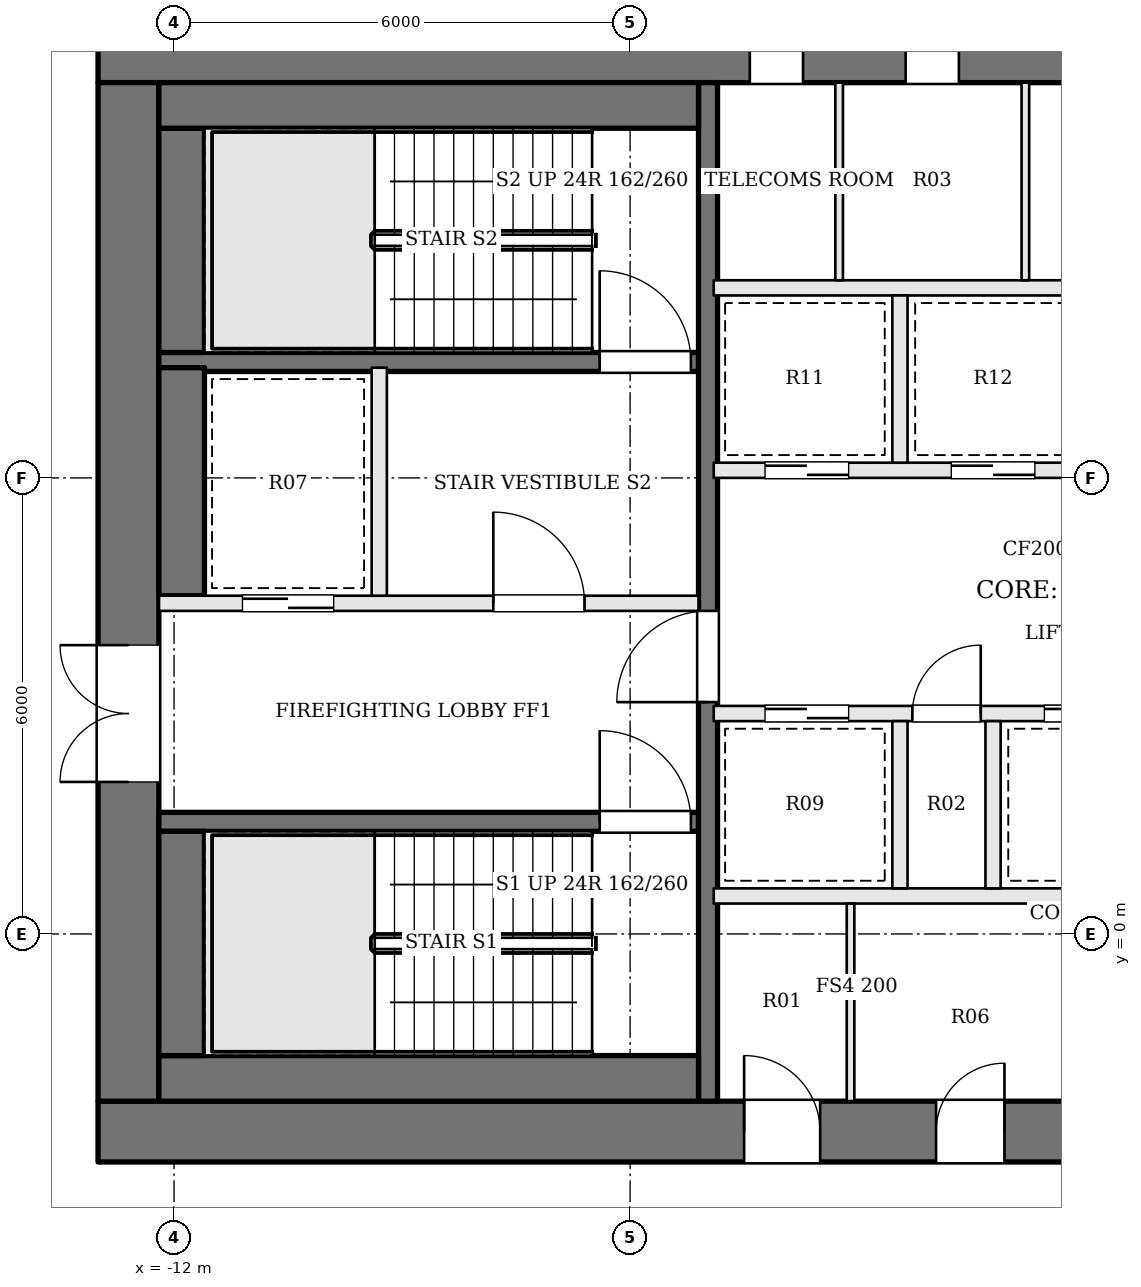
"""IFC4 building model, lengths in metres.
Left out: names, types, materials, properties, quantities, classifications, styles, units other than length and angle.
Written with IfcOpenShell. Run it as: python <this file> out.ifc"""

import sys

from ifc_helpers import new_model, si_unit, direction, frame, frame_2d, origin, place, context, subcontext, project, spatial, rectangle, extrude, element, fill, save


model = new_model("IFC4")
c1 = context("Model", 3, precision=1e-05, world=origin(), true_north=direction((0.0, 1.0)))
c2 = subcontext(c1, "Body", "Model", "MODEL_VIEW")
j1 = project(units=[si_unit("LENGTHUNIT", "METRE"), si_unit("PLANEANGLEUNIT", "RADIAN")], contexts=[c1])
p1 = place(None, origin())
s1 = spatial("IfcSite", under=j1, at=p1, CompositionType="ELEMENT")
p2 = place(p1, origin())
s2 = spatial("IfcBuilding", under=s1, at=p2, CompositionType="ELEMENT")
p3 = place(p2, frame((0.0, 0.0, 237.0)))
s3 = spatial("IfcBuildingStorey", under=s2, at=p3, CompositionType="ELEMENT", Elevation=237.0)
p4 = place(p3, frame((-13.0, 11.6, 0.0), z_axis=(0.0, 0.0, 1.0), x_axis=(1.0, 0.0, 0.0)))
e1 = element("IfcWall", 1, at=p4, inside=s3, PredefinedType="SHEAR", context=c2, shape_type="SweptSolid", body=[
    extrude(rectangle(XDim=26.0, YDim=0.8, at=frame_2d((13.0, 0.0))), origin(), (0.0, 0.0, 1.0), 3.9),
])
p5 = place(p4, frame((8.575, 0.0, 0.0)))
e2 = element("IfcOpeningElement", 2, at=p5, cuts=e1, PredefinedType="OPENING", context=c2, shape_type="SweptSolid", body=[
    extrude(rectangle(XDim=0.7, YDim=2.1, at=frame_2d((0.35, 1.05))), frame((0.0, 0.41, 0.0), z_axis=(0.0, -1.0, 0.0), x_axis=(1.0, 0.0, 0.0)), (0.0, 0.0, 1.0), 0.82),
])
p6 = place(p4, frame((10.625, 0.0, 0.0)))
e3 = element("IfcOpeningElement", 3, at=p6, cuts=e1, PredefinedType="OPENING", context=c2, shape_type="SweptSolid", body=[
    extrude(rectangle(XDim=0.7, YDim=2.1, at=frame_2d((0.35, 1.05))), frame((0.0, 0.41, 0.0), z_axis=(0.0, -1.0, 0.0), x_axis=(1.0, 0.0, 0.0)), (0.0, 0.0, 1.0), 0.82),
])
p7 = place(p4, frame((13.325, 0.0, 0.0)))
e4 = element("IfcOpeningElement", 4, at=p7, cuts=e1, PredefinedType="OPENING", context=c2, shape_type="SweptSolid", body=[
    extrude(rectangle(XDim=1.0, YDim=2.1, at=frame_2d((0.5, 1.05))), frame((0.0, 0.41, 0.0), z_axis=(0.0, -1.0, 0.0), x_axis=(1.0, 0.0, 0.0)), (0.0, 0.0, 1.0), 0.82),
])
p8 = place(p4, frame((15.65, 0.0, 0.0)))
e5 = element("IfcOpeningElement", 5, at=p8, cuts=e1, PredefinedType="OPENING", context=c2, shape_type="SweptSolid", body=[
    extrude(rectangle(XDim=1.0, YDim=2.1, at=frame_2d((0.5, 1.05))), frame((0.0, 0.41, 0.0), z_axis=(0.0, -1.0, 0.0), x_axis=(1.0, 0.0, 0.0)), (0.0, 0.0, 1.0), 0.82),
])
p9 = place(p3, frame((-13.0, -2.6, 0.0), z_axis=(0.0, 0.0, 1.0), x_axis=(1.0, 0.0, 0.0)))
e6 = element("IfcWall", 6, at=p9, inside=s3, PredefinedType="SHEAR", context=c2, shape_type="SweptSolid", body=[
    extrude(rectangle(XDim=26.0, YDim=0.8, at=frame_2d((13.0, 0.0))), origin(), (0.0, 0.0, 1.0), 3.9),
])
p10 = place(p9, frame((8.5, 0.0, 0.0)))
e7 = element("IfcOpeningElement", 7, at=p10, cuts=e6, PredefinedType="OPENING", context=c2, shape_type="SweptSolid", body=[
    extrude(rectangle(XDim=1.0, YDim=2.1, at=frame_2d((0.5, 1.05))), frame((0.0, 0.41, 0.0), z_axis=(0.0, -1.0, 0.0), x_axis=(1.0, 0.0, 0.0)), (0.0, 0.0, 1.0), 0.82),
])
p11 = place(p9, frame((11.025, 0.0, 0.0)))
e8 = element("IfcOpeningElement", 8, at=p11, cuts=e6, PredefinedType="OPENING", context=c2, shape_type="SweptSolid", body=[
    extrude(rectangle(XDim=0.9, YDim=2.1, at=frame_2d((0.45, 1.05))), frame((0.0, 0.41, 0.0), z_axis=(0.0, -1.0, 0.0), x_axis=(1.0, 0.0, 0.0)), (0.0, 0.0, 1.0), 0.82),
])
p12 = place(p9, frame((14.225, 0.0, 0.0)))
e9 = element("IfcOpeningElement", 9, at=p12, cuts=e6, PredefinedType="OPENING", context=c2, shape_type="SweptSolid", body=[
    extrude(rectangle(XDim=0.9, YDim=2.1, at=frame_2d((0.45, 1.05))), frame((0.0, 0.41, 0.0), z_axis=(0.0, -1.0, 0.0), x_axis=(1.0, 0.0, 0.0)), (0.0, 0.0, 1.0), 0.82),
])
p13 = place(p9, frame((16.6, 0.0, 0.0)))
e10 = element("IfcOpeningElement", 10, at=p13, cuts=e6, PredefinedType="OPENING", context=c2, shape_type="SweptSolid", body=[
    extrude(rectangle(XDim=1.0, YDim=2.1, at=frame_2d((0.5, 1.05))), frame((0.0, 0.41, 0.0), z_axis=(0.0, -1.0, 0.0), x_axis=(1.0, 0.0, 0.0)), (0.0, 0.0, 1.0), 0.82),
])
p14 = place(p3, frame((-12.6, -2.2, 0.0), z_axis=(0.0, 0.0, 1.0), x_axis=(0.0, 1.0, 0.0)))
e11 = element("IfcWall", 11, at=p14, inside=s3, PredefinedType="SHEAR", context=c2, shape_type="SweptSolid", body=[
    extrude(rectangle(XDim=13.4, YDim=0.8, at=frame_2d((6.7, 0.0))), origin(), (0.0, 0.0, 1.0), 3.9),
])
p15 = place(p14, frame((4.2, 0.0, 0.0)))
e12 = element("IfcOpeningElement", 12, at=p15, cuts=e11, PredefinedType="OPENING", context=c2, shape_type="SweptSolid", body=[
    extrude(rectangle(XDim=1.8, YDim=2.1, at=frame_2d((0.9, 1.05))), frame((0.0, 0.41, 0.0), z_axis=(0.0, -1.0, 0.0), x_axis=(1.0, 0.0, 0.0)), (0.0, 0.0, 1.0), 0.82),
])
p16 = place(p3, frame((-12.2, 1.475, 0.0), z_axis=(0.0, 0.0, 1.0), x_axis=(1.0, 0.0, 0.0)))
e13 = element("IfcWall", 13, at=p16, inside=s3, PredefinedType="SOLIDWALL", context=c2, shape_type="SweptSolid", body=[
    extrude(rectangle(XDim=7.1, YDim=0.25, at=frame_2d((3.55, 0.0))), origin(), (0.0, 0.0, 1.0), 3.7),
])
p17 = place(p16, frame((5.8, 0.0, 0.0)))
e14 = element("IfcOpeningElement", 14, at=p17, cuts=e13, PredefinedType="OPENING", context=c2, shape_type="SweptSolid", body=[
    extrude(rectangle(XDim=1.2, YDim=2.1, at=frame_2d((0.6, 1.05))), frame((0.0, 0.135, 0.0), z_axis=(0.0, -1.0, 0.0), x_axis=(1.0, 0.0, 0.0)), (0.0, 0.0, 1.0), 0.27),
])
p18 = place(p3, frame((-12.2, 4.35, 0.0), z_axis=(0.0, 0.0, 1.0), x_axis=(1.0, 0.0, 0.0)))
e15 = element("IfcWall", 15, at=p18, inside=s3, PredefinedType="SOLIDWALL", context=c2, shape_type="SweptSolid", body=[
    extrude(rectangle(XDim=7.1, YDim=0.2, at=frame_2d((3.55, 0.0))), origin(), (0.0, 0.0, 1.0), 3.7),
])
p19 = place(p18, frame((4.4, 0.0, 0.0)))
e16 = element("IfcOpeningElement", 16, at=p19, cuts=e15, PredefinedType="OPENING", context=c2, shape_type="SweptSolid", body=[
    extrude(rectangle(XDim=1.2, YDim=2.1, at=frame_2d((0.6, 1.05))), frame((0.0, 0.11, 0.0), z_axis=(0.0, -1.0, 0.0), x_axis=(1.0, 0.0, 0.0)), (0.0, 0.0, 1.0), 0.22),
])
p20 = place(p18, frame((1.1, 0.0, 0.0)))
e17 = element("IfcOpeningElement", 17, at=p20, cuts=e15, PredefinedType="OPENING", context=c2, shape_type="SweptSolid", body=[
    extrude(rectangle(XDim=1.2, YDim=2.1, at=frame_2d((0.6, 1.05))), frame((0.0, 0.11, 0.0), z_axis=(0.0, -1.0, 0.0), x_axis=(1.0, 0.0, 0.0)), (0.0, 0.0, 1.0), 0.22),
])
p21 = place(p3, frame((-12.2, 7.525, 0.0), z_axis=(0.0, 0.0, 1.0), x_axis=(1.0, 0.0, 0.0)))
e18 = element("IfcWall", 18, at=p21, inside=s3, PredefinedType="SOLIDWALL", context=c2, shape_type="SweptSolid", body=[
    extrude(rectangle(XDim=7.1, YDim=0.25, at=frame_2d((3.55, 0.0))), origin(), (0.0, 0.0, 1.0), 3.7),
])
p22 = place(p21, frame((5.8, 0.0, 0.0)))
e19 = element("IfcOpeningElement", 19, at=p22, cuts=e18, PredefinedType="OPENING", context=c2, shape_type="SweptSolid", body=[
    extrude(rectangle(XDim=1.2, YDim=2.1, at=frame_2d((0.6, 1.05))), frame((0.0, 0.135, 0.0), z_axis=(0.0, -1.0, 0.0), x_axis=(1.0, 0.0, 0.0)), (0.0, 0.0, 1.0), 0.27),
])
p23 = place(p3, frame((-9.3, 4.45, 0.0), z_axis=(0.0, 0.0, 1.0), x_axis=(0.0, 1.0, 0.0)))
e20 = element("IfcWall", 20, at=p23, inside=s3, PredefinedType="SOLIDWALL", context=c2, shape_type="SweptSolid", body=[
    extrude(rectangle(XDim=3.0, YDim=0.2, at=frame_2d((1.5, 0.0))), origin(), (0.0, 0.0, 1.0), 3.7),
])
p24 = place(p3, frame((-4.975, -2.2, 0.0), z_axis=(0.0, 0.0, 1.0), x_axis=(0.0, 1.0, 0.0)))
e21 = element("IfcWall", 21, at=p24, inside=s3, PredefinedType="SOLIDWALL", context=c2, shape_type="SweptSolid", body=[
    extrude(rectangle(XDim=13.4, YDim=0.25, at=frame_2d((6.7, 0.0))), origin(), (0.0, 0.0, 1.0), 3.7),
])
p25 = place(p24, frame((5.25, 0.0, 0.0)))
e22 = element("IfcOpeningElement", 22, at=p25, cuts=e21, PredefinedType="OPENING", context=c2, shape_type="SweptSolid", body=[
    extrude(rectangle(XDim=1.2, YDim=2.1, at=frame_2d((0.6, 1.05))), frame((0.0, 0.135, 0.0), z_axis=(0.0, -1.0, 0.0), x_axis=(1.0, 0.0, 0.0)), (0.0, 0.0, 1.0), 0.27),
])
p26 = place(p3, frame((-12.2, -1.9, 0.0), z_axis=(0.0, 0.0, 1.0), x_axis=(1.0, 0.0, 0.0)))
e23 = element("IfcWall", 23, at=p26, inside=s3, PredefinedType="SOLIDWALL", context=c2, shape_type="SweptSolid", body=[
    extrude(rectangle(XDim=7.1, YDim=0.6, at=frame_2d((3.55, 0.0))), origin(), (0.0, 0.0, 1.0), 3.7),
])
p27 = place(p3, frame((-11.9, -1.6, 0.0), z_axis=(0.0, 0.0, 1.0), x_axis=(0.0, 1.0, 0.0)))
e24 = element("IfcWall", 24, at=p27, inside=s3, PredefinedType="SOLIDWALL", context=c2, shape_type="SweptSolid", body=[
    extrude(rectangle(XDim=2.95, YDim=0.6, at=frame_2d((1.475, 0.0))), origin(), (0.0, 0.0, 1.0), 3.7),
])
p28 = place(p3, frame((-11.9, 4.45, 0.0), z_axis=(0.0, 0.0, 1.0), x_axis=(0.0, 1.0, 0.0)))
e25 = element("IfcWall", 25, at=p28, inside=s3, PredefinedType="SOLIDWALL", context=c2, shape_type="SweptSolid", body=[
    extrude(rectangle(XDim=3.0, YDim=0.6, at=frame_2d((1.5, 0.0))), origin(), (0.0, 0.0, 1.0), 3.7),
])
p29 = place(p3, frame((-11.9, 7.65, 0.0), z_axis=(0.0, 0.0, 1.0), x_axis=(0.0, 1.0, 0.0)))
e26 = element("IfcWall", 26, at=p29, inside=s3, PredefinedType="SOLIDWALL", context=c2, shape_type="SweptSolid", body=[
    extrude(rectangle(XDim=2.95, YDim=0.6, at=frame_2d((1.475, 0.0))), origin(), (0.0, 0.0, 1.0), 3.7),
])
p30 = place(p3, frame((-12.2, 10.9, 0.0), z_axis=(0.0, 0.0, 1.0), x_axis=(1.0, 0.0, 0.0)))
e27 = element("IfcWall", 27, at=p30, inside=s3, PredefinedType="SOLIDWALL", context=c2, shape_type="SweptSolid", body=[
    extrude(rectangle(XDim=7.1, YDim=0.6, at=frame_2d((3.55, 0.0))), origin(), (0.0, 0.0, 1.0), 3.7),
])
p31 = place(p3, frame((-4.9, 0.5, 0.0), z_axis=(0.0, 0.0, 1.0), x_axis=(1.0, 0.0, 0.0)))
e28 = element("IfcWall", 28, at=p31, inside=s3, PredefinedType="SOLIDWALL", context=c2, shape_type="SweptSolid", body=[
    extrude(rectangle(XDim=9.8, YDim=0.2, at=frame_2d((4.9, 0.0))), origin(), (0.0, 0.0, 1.0), 3.7),
])
p32 = place(p3, frame((-4.9, 2.9, 0.0), z_axis=(0.0, 0.0, 1.0), x_axis=(1.0, 0.0, 0.0)))
e29 = element("IfcWall", 29, at=p32, inside=s3, PredefinedType="SOLIDWALL", context=c2, shape_type="SweptSolid", body=[
    extrude(rectangle(XDim=9.8, YDim=0.2, at=frame_2d((4.9, 0.0))), origin(), (0.0, 0.0, 1.0), 3.7),
])
p33 = place(p32, frame((0.675, 0.0, 0.0)))
e30 = element("IfcOpeningElement", 30, at=p33, cuts=e29, PredefinedType="OPENING", context=c2, shape_type="SweptSolid", body=[
    extrude(rectangle(XDim=1.1, YDim=2.1, at=frame_2d((0.55, 1.05))), frame((0.0, 0.11, 0.0), z_axis=(0.0, -1.0, 0.0), x_axis=(1.0, 0.0, 0.0)), (0.0, 0.0, 1.0), 0.22),
])
p34 = place(p32, frame((2.613, 0.0, 0.0)))
e31 = element("IfcOpeningElement", 31, at=p34, cuts=e29, PredefinedType="OPENING", context=c2, shape_type="SweptSolid", body=[
    extrude(rectangle(XDim=0.9, YDim=2.1, at=frame_2d((0.45, 1.05))), frame((0.0, 0.11, 0.0), z_axis=(0.0, -1.0, 0.0), x_axis=(1.0, 0.0, 0.0)), (0.0, 0.0, 1.0), 0.22),
])
p35 = place(p32, frame((4.35, 0.0, 0.0)))
e32 = element("IfcOpeningElement", 32, at=p35, cuts=e29, PredefinedType="OPENING", context=c2, shape_type="SweptSolid", body=[
    extrude(rectangle(XDim=1.1, YDim=2.1, at=frame_2d((0.55, 1.05))), frame((0.0, 0.11, 0.0), z_axis=(0.0, -1.0, 0.0), x_axis=(1.0, 0.0, 0.0)), (0.0, 0.0, 1.0), 0.22),
])
p36 = place(p32, frame((7.463, 0.0, 0.0)))
e33 = element("IfcOpeningElement", 33, at=p36, cuts=e29, PredefinedType="OPENING", context=c2, shape_type="SweptSolid", body=[
    extrude(rectangle(XDim=1.0, YDim=2.1, at=frame_2d((0.5, 1.05))), frame((0.0, 0.11, 0.0), z_axis=(0.0, -1.0, 0.0), x_axis=(1.0, 0.0, 0.0)), (0.0, 0.0, 1.0), 0.22),
])
p37 = place(p3, frame((-4.9, 6.1, 0.0), z_axis=(0.0, 0.0, 1.0), x_axis=(1.0, 0.0, 0.0)))
e34 = element("IfcWall", 34, at=p37, inside=s3, PredefinedType="SOLIDWALL", context=c2, shape_type="SweptSolid", body=[
    extrude(rectangle(XDim=9.8, YDim=0.2, at=frame_2d((4.9, 0.0))), origin(), (0.0, 0.0, 1.0), 3.7),
])
p38 = place(p37, frame((0.675, 0.0, 0.0)))
e35 = element("IfcOpeningElement", 35, at=p38, cuts=e34, PredefinedType="OPENING", context=c2, shape_type="SweptSolid", body=[
    extrude(rectangle(XDim=1.1, YDim=2.1, at=frame_2d((0.55, 1.05))), frame((0.0, 0.11, 0.0), z_axis=(0.0, -1.0, 0.0), x_axis=(1.0, 0.0, 0.0)), (0.0, 0.0, 1.0), 0.22),
])
p39 = place(p37, frame((3.125, 0.0, 0.0)))
e36 = element("IfcOpeningElement", 36, at=p39, cuts=e34, PredefinedType="OPENING", context=c2, shape_type="SweptSolid", body=[
    extrude(rectangle(XDim=1.1, YDim=2.1, at=frame_2d((0.55, 1.05))), frame((0.0, 0.11, 0.0), z_axis=(0.0, -1.0, 0.0), x_axis=(1.0, 0.0, 0.0)), (0.0, 0.0, 1.0), 0.22),
])
p40 = place(p37, frame((5.575, 0.0, 0.0)))
e37 = element("IfcOpeningElement", 37, at=p40, cuts=e34, PredefinedType="OPENING", context=c2, shape_type="SweptSolid", body=[
    extrude(rectangle(XDim=1.1, YDim=2.1, at=frame_2d((0.55, 1.05))), frame((0.0, 0.11, 0.0), z_axis=(0.0, -1.0, 0.0), x_axis=(1.0, 0.0, 0.0)), (0.0, 0.0, 1.0), 0.22),
])
p41 = place(p37, frame((8.025, 0.0, 0.0)))
e38 = element("IfcOpeningElement", 38, at=p41, cuts=e34, PredefinedType="OPENING", context=c2, shape_type="SweptSolid", body=[
    extrude(rectangle(XDim=1.1, YDim=2.1, at=frame_2d((0.55, 1.05))), frame((0.0, 0.11, 0.0), z_axis=(0.0, -1.0, 0.0), x_axis=(1.0, 0.0, 0.0)), (0.0, 0.0, 1.0), 0.22),
])
p42 = place(p3, frame((-4.9, 8.5, 0.0), z_axis=(0.0, 0.0, 1.0), x_axis=(1.0, 0.0, 0.0)))
e39 = element("IfcWall", 39, at=p42, inside=s3, PredefinedType="SOLIDWALL", context=c2, shape_type="SweptSolid", body=[
    extrude(rectangle(XDim=9.8, YDim=0.2, at=frame_2d((4.9, 0.0))), origin(), (0.0, 0.0, 1.0), 3.7),
])
for number, where, z_axis, x_axis in (
    (40, (-2.45, 0.6, 0.0), (0.0, 0.0, 1.0), (0.0, 1.0, 0.0)),
    (41, (-1.225, 0.6, 0.0), (0.0, 0.0, 1.0), (0.0, 1.0, 0.0)),
    (42, (-2.45, 6.2, 0.0), (0.0, 0.0, 1.0), (0.0, 1.0, 0.0)),
):
    element("IfcWall", number, at=place(p3, frame(where, z_axis=z_axis, x_axis=x_axis)), inside=s3, PredefinedType="SOLIDWALL", context=c2, shape_type="SweptSolid", body=[
        extrude(rectangle(XDim=2.2, YDim=0.2, at=frame_2d((1.1, 0.0))), origin(), (0.0, 0.0, 1.0), 3.7),
    ])
for number, where, z_axis, x_axis in (
    (43, (-3.1, -2.2, 0.0), (0.0, 0.0, 1.0), (0.0, 1.0, 0.0)),
    (44, (-3.25, 8.6, 0.0), (0.0, 0.0, 1.0), (0.0, 1.0, 0.0)),
    (45, (-0.8, 8.6, 0.0), (0.0, 0.0, 1.0), (0.0, 1.0, 0.0)),
):
    element("IfcWall", number, at=place(p3, frame(where, z_axis=z_axis, x_axis=x_axis)), inside=s3, PredefinedType="PARTITIONING", context=c2, shape_type="SweptSolid", body=[
        extrude(rectangle(XDim=2.6, YDim=0.1, at=frame_2d((1.3, 0.0))), origin(), (0.0, 0.0, 1.0), 3.7),
    ])
p43 = place(p15, origin())
e46 = element("IfcDoor", 46, at=p43, inside=s3, OperationType="DOUBLE_DOOR_SINGLE_SWING", PredefinedType="DOOR", context=c2, shape_type="SweptSolid", body=[
    extrude(rectangle(XDim=1.8, YDim=2.1, at=frame_2d((0.9, 1.05))), frame((0.0, 0.025, 0.0), z_axis=(0.0, -1.0, 0.0), x_axis=(1.0, 0.0, 0.0)), (0.0, 0.0, 1.0), 0.05),
])
fill(e12, e46)
p44 = place(p25, origin())
e47 = element("IfcDoor", 47, at=p44, inside=s3, OperationType="SINGLE_SWING_LEFT", PredefinedType="DOOR", context=c2, shape_type="SweptSolid", body=[
    extrude(rectangle(XDim=1.2, YDim=2.1, at=frame_2d((0.6, 1.05))), frame((0.0, 0.025, 0.0), z_axis=(0.0, -1.0, 0.0), x_axis=(1.0, 0.0, 0.0)), (0.0, 0.0, 1.0), 0.05),
])
fill(e22, e47)
p45 = place(p19, origin())
e48 = element("IfcDoor", 48, at=p45, inside=s3, OperationType="SINGLE_SWING_LEFT", PredefinedType="DOOR", context=c2, shape_type="SweptSolid", body=[
    extrude(rectangle(XDim=1.2, YDim=2.1, at=frame_2d((0.6, 1.05))), frame((0.0, 0.025, 0.0), z_axis=(0.0, -1.0, 0.0), x_axis=(1.0, 0.0, 0.0)), (0.0, 0.0, 1.0), 0.05),
])
fill(e16, e48)
p46 = place(p17, origin())
e49 = element("IfcDoor", 49, at=p46, inside=s3, OperationType="SINGLE_SWING_LEFT", PredefinedType="DOOR", context=c2, shape_type="SweptSolid", body=[
    extrude(rectangle(XDim=1.2, YDim=2.1, at=frame_2d((0.6, 1.05))), frame((0.0, 0.025, 0.0), z_axis=(0.0, -1.0, 0.0), x_axis=(1.0, 0.0, 0.0)), (0.0, 0.0, 1.0), 0.05),
])
fill(e14, e49)
p47 = place(p22, origin())
e50 = element("IfcDoor", 50, at=p47, inside=s3, OperationType="SINGLE_SWING_LEFT", PredefinedType="DOOR", context=c2, shape_type="SweptSolid", body=[
    extrude(rectangle(XDim=1.2, YDim=2.1, at=frame_2d((0.6, 1.05))), frame((0.0, 0.025, 0.0), z_axis=(0.0, -1.0, 0.0), x_axis=(1.0, 0.0, 0.0)), (0.0, 0.0, 1.0), 0.05),
])
fill(e19, e50)
p48 = place(p20, origin())
e51 = element("IfcDoor", 51, at=p48, inside=s3, OperationType="SLIDING_TO_RIGHT", PredefinedType="DOOR", context=c2, shape_type="SweptSolid", body=[
    extrude(rectangle(XDim=1.2, YDim=2.1, at=frame_2d((0.6, 1.05))), frame((0.0, 0.025, 0.0), z_axis=(0.0, -1.0, 0.0), x_axis=(1.0, 0.0, 0.0)), (0.0, 0.0, 1.0), 0.05),
])
fill(e17, e51)
p49 = place(p33, origin())
e52 = element("IfcDoor", 52, at=p49, inside=s3, OperationType="SLIDING_TO_RIGHT", PredefinedType="DOOR", context=c2, shape_type="SweptSolid", body=[
    extrude(rectangle(XDim=1.1, YDim=2.1, at=frame_2d((0.55, 1.05))), frame((0.0, 0.025, 0.0), z_axis=(0.0, -1.0, 0.0), x_axis=(1.0, 0.0, 0.0)), (0.0, 0.0, 1.0), 0.05),
])
fill(e30, e52)
p50 = place(p34, origin())
e53 = element("IfcDoor", 53, at=p50, inside=s3, OperationType="SINGLE_SWING_RIGHT", PredefinedType="DOOR", context=c2, shape_type="SweptSolid", body=[
    extrude(rectangle(XDim=0.9, YDim=2.1, at=frame_2d((0.45, 1.05))), frame((0.0, 0.025, 0.0), z_axis=(0.0, -1.0, 0.0), x_axis=(1.0, 0.0, 0.0)), (0.0, 0.0, 1.0), 0.05),
])
fill(e31, e53)
p51 = place(p35, origin())
e54 = element("IfcDoor", 54, at=p51, inside=s3, OperationType="SLIDING_TO_LEFT", PredefinedType="DOOR", context=c2, shape_type="SweptSolid", body=[
    extrude(rectangle(XDim=1.1, YDim=2.1, at=frame_2d((0.55, 1.05))), frame((0.0, 0.025, 0.0), z_axis=(0.0, -1.0, 0.0), x_axis=(1.0, 0.0, 0.0)), (0.0, 0.0, 1.0), 0.05),
])
fill(e32, e54)
p52 = place(p38, origin())
e55 = element("IfcDoor", 55, at=p52, inside=s3, OperationType="SLIDING_TO_RIGHT", PredefinedType="DOOR", context=c2, shape_type="SweptSolid", body=[
    extrude(rectangle(XDim=1.1, YDim=2.1, at=frame_2d((0.55, 1.05))), frame((0.0, 0.025, 0.0), z_axis=(0.0, -1.0, 0.0), x_axis=(1.0, 0.0, 0.0)), (0.0, 0.0, 1.0), 0.05),
])
fill(e35, e55)
p53 = place(p39, origin())
e56 = element("IfcDoor", 56, at=p53, inside=s3, OperationType="SLIDING_TO_LEFT", PredefinedType="DOOR", context=c2, shape_type="SweptSolid", body=[
    extrude(rectangle(XDim=1.1, YDim=2.1, at=frame_2d((0.55, 1.05))), frame((0.0, 0.025, 0.0), z_axis=(0.0, -1.0, 0.0), x_axis=(1.0, 0.0, 0.0)), (0.0, 0.0, 1.0), 0.05),
])
fill(e36, e56)
p54 = place(p10, origin())
e57 = element("IfcDoor", 57, at=p54, inside=s3, OperationType="SINGLE_SWING_LEFT", PredefinedType="DOOR", context=c2, shape_type="SweptSolid", body=[
    extrude(rectangle(XDim=1.0, YDim=2.1, at=frame_2d((0.5, 1.05))), frame((0.0, 0.025, 0.0), z_axis=(0.0, -1.0, 0.0), x_axis=(1.0, 0.0, 0.0)), (0.0, 0.0, 1.0), 0.05),
])
fill(e7, e57)
p55 = place(p11, origin())
e58 = element("IfcDoor", 58, at=p55, inside=s3, OperationType="SINGLE_SWING_RIGHT", PredefinedType="DOOR", context=c2, shape_type="SweptSolid", body=[
    extrude(rectangle(XDim=0.9, YDim=2.1, at=frame_2d((0.45, 1.05))), frame((0.0, 0.025, 0.0), z_axis=(0.0, -1.0, 0.0), x_axis=(1.0, 0.0, 0.0)), (0.0, 0.0, 1.0), 0.05),
])
fill(e8, e58)
p56 = place(p5, origin())
e59 = element("IfcDoor", 59, at=p56, inside=s3, OperationType="SINGLE_SWING_LEFT", PredefinedType="DOOR", context=c2, shape_type="SweptSolid", body=[
    extrude(rectangle(XDim=0.7, YDim=2.1, at=frame_2d((0.35, 1.05))), frame((0.0, 0.025, 0.0), z_axis=(0.0, -1.0, 0.0), x_axis=(1.0, 0.0, 0.0)), (0.0, 0.0, 1.0), 0.05),
])
fill(e2, e59)
p57 = place(p6, origin())
e60 = element("IfcDoor", 60, at=p57, inside=s3, OperationType="SINGLE_SWING_RIGHT", PredefinedType="DOOR", context=c2, shape_type="SweptSolid", body=[
    extrude(rectangle(XDim=0.7, YDim=2.1, at=frame_2d((0.35, 1.05))), frame((0.0, 0.025, 0.0), z_axis=(0.0, -1.0, 0.0), x_axis=(1.0, 0.0, 0.0)), (0.0, 0.0, 1.0), 0.05),
])
fill(e3, e60)
save(model, sys.argv[1])
